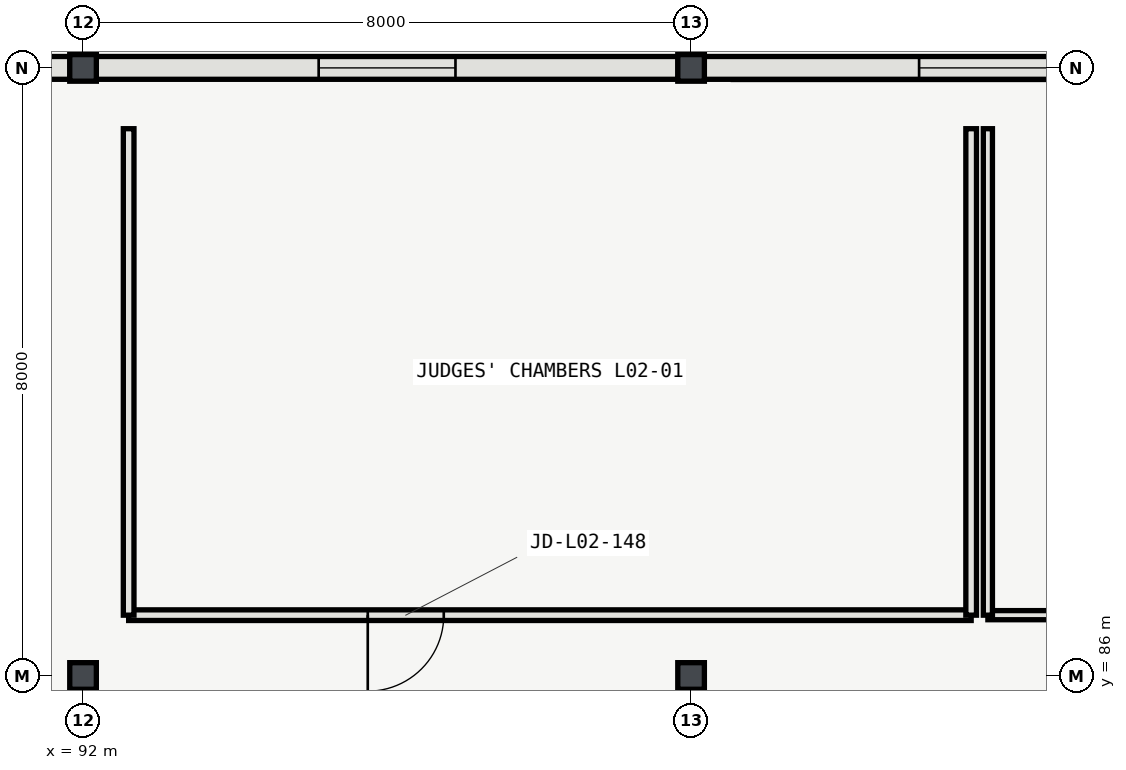
"""IFC4 building model, lengths in metres.
Left out: names, types, materials, properties, quantities, classifications, styles, units other than length and angle.
Written with IfcOpenShell. Run it as: python <this file> out.ifc"""

import sys

from ifc_helpers import new_model, si_unit, direction, frame, frame_2d, origin, origin_2d, place, context, subcontext, project, spatial, rectangle, i_section, extrude, element, fill, save


model = new_model("IFC4")
c1 = context("Model", 3, precision=1e-05, world=origin(), true_north=direction((0.0, 1.0)))
c2 = subcontext(c1, "Body", "Model", "MODEL_VIEW")
j1 = project(units=[si_unit("LENGTHUNIT", "METRE"), si_unit("PLANEANGLEUNIT", "RADIAN")], contexts=[c1])
p1 = place(None, origin())
s1 = spatial("IfcSite", under=j1, at=p1, CompositionType="ELEMENT")
p2 = place(p1, origin())
s2 = spatial("IfcBuilding", under=s1, at=p2, CompositionType="ELEMENT")
p3 = place(p2, frame((0.0, 0.0, 10.8)))
s3 = spatial("IfcBuildingStorey", under=s2, at=p3, CompositionType="ELEMENT", Elevation=10.8)
for number, where, z_axis, x_axis in (
    (1, (92.0, 86.0, 0.0), (0.0, 0.0, 1.0), (1.0, 0.0, 0.0)),
    (2, (92.0, 94.0, 0.0), (0.0, 0.0, 1.0), (1.0, 0.0, 0.0)),
    (3, (100.0, 86.0, 0.0), (0.0, 0.0, 1.0), (1.0, 0.0, 0.0)),
    (4, (100.0, 94.0, 0.0), (0.0, 0.0, 1.0), (1.0, 0.0, 0.0)),
):
    element("IfcColumn", number, at=place(p3, frame(where, z_axis=z_axis, x_axis=x_axis)), inside=s3, PredefinedType="COLUMN", context=c2, shape_type="SweptSolid", body=[
        extrude(i_section(OverallWidth=0.35, OverallDepth=0.35, WebThickness=0.012, FlangeThickness=0.019, FilletRadius=0.02, at=origin_2d()), origin(), (0.0, 0.0, 1.0), 5.4),
    ])
p4 = place(p3, frame((91.829, 94.0, 0.0), z_axis=(0.0, 0.0, 1.0), x_axis=(-1.0, 0.0, 0.0)))
e5 = element("IfcWall", 5, at=p4, inside=s3, PredefinedType="SOLIDWALL", context=c2, shape_type="SweptSolid", body=[
    extrude(rectangle(XDim=7.483, YDim=0.3, at=frame_2d((3.742, 0.0))), origin(), (0.0, 0.0, 1.0), 4.763),
])
p5 = place(p4, frame((3.004, 0.0, 0.95)))
e6 = element("IfcOpeningElement", 6, at=p5, cuts=e5, PredefinedType="OPENING", context=c2, shape_type="SweptSolid", body=[
    extrude(rectangle(XDim=1.65, YDim=2.1, at=frame_2d((0.825, 1.05))), frame((0.0, 0.16, 0.0), z_axis=(0.0, -1.0, 0.0), x_axis=(1.0, 0.0, 0.0)), (0.0, 0.0, 1.0), 0.32),
])
p6 = place(p3, frame((99.829, 94.0, 0.0), z_axis=(0.0, 0.0, 1.0), x_axis=(-1.0, 0.0, 0.0)))
e7 = element("IfcWall", 7, at=p6, inside=s3, PredefinedType="SOLIDWALL", context=c2, shape_type="SweptSolid", body=[
    extrude(rectangle(XDim=7.658, YDim=0.3, at=frame_2d((3.829, 0.0))), origin(), (0.0, 0.0, 1.0), 4.763),
])
p7 = place(p6, frame((2.929, 0.0, 0.95)))
e8 = element("IfcOpeningElement", 8, at=p7, cuts=e7, PredefinedType="OPENING", context=c2, shape_type="SweptSolid", body=[
    extrude(rectangle(XDim=1.8, YDim=2.1, at=frame_2d((0.9, 1.05))), frame((0.0, 0.16, 0.0), z_axis=(0.0, -1.0, 0.0), x_axis=(1.0, 0.0, 0.0)), (0.0, 0.0, 1.0), 0.32),
])
p8 = place(p3, frame((107.829, 94.0, 0.0), z_axis=(0.0, 0.0, 1.0), x_axis=(-1.0, 0.0, 0.0)))
e9 = element("IfcWall", 9, at=p8, inside=s3, PredefinedType="SOLIDWALL", context=c2, shape_type="SweptSolid", body=[
    extrude(rectangle(XDim=7.658, YDim=0.3, at=frame_2d((3.829, 0.0))), origin(), (0.0, 0.0, 1.0), 4.763),
])
p9 = place(p8, frame((2.829, 0.0, 0.95)))
e10 = element("IfcOpeningElement", 10, at=p9, cuts=e9, PredefinedType="OPENING", context=c2, shape_type="SweptSolid", body=[
    extrude(rectangle(XDim=2.0, YDim=2.1, at=frame_2d((1.0, 1.05))), frame((0.0, 0.16, 0.0), z_axis=(0.0, -1.0, 0.0), x_axis=(1.0, 0.0, 0.0)), (0.0, 0.0, 1.0), 0.32),
])
p10 = place(p3, frame((92.6, 86.8, 0.0), z_axis=(0.0, 0.0, 1.0), x_axis=(1.0, 0.0, 0.0)))
e11 = element("IfcWall", 11, at=p10, inside=s3, PredefinedType="PARTITIONING", context=c2, shape_type="SweptSolid", body=[
    extrude(rectangle(XDim=11.085, YDim=0.14, at=frame_2d((5.542, 0.0))), origin(), (0.0, 0.0, 1.0), 5.12),
])
p11 = place(p10, frame((3.146, 0.0, 0.0)))
e12 = element("IfcOpeningElement", 12, at=p11, cuts=e11, PredefinedType="OPENING", context=c2, shape_type="SweptSolid", body=[
    extrude(rectangle(XDim=1.0, YDim=2.2, at=frame_2d((0.5, 1.1))), frame((0.0, 0.08, 0.0), z_axis=(0.0, -1.0, 0.0), x_axis=(1.0, 0.0, 0.0)), (0.0, 0.0, 1.0), 0.16),
])
p12 = place(p3, frame((92.6, 93.2, 0.0), z_axis=(0.0, 0.0, 1.0), x_axis=(0.0, -1.0, 0.0)))
e13 = element("IfcWall", 13, at=p12, inside=s3, PredefinedType="PARTITIONING", context=c2, shape_type="SweptSolid", body=[
    extrude(rectangle(XDim=6.4, YDim=0.14, at=frame_2d((3.2, 0.0))), origin(), (0.0, 0.0, 1.0), 5.12),
])
p13 = place(p3, frame((103.685, 86.8, 0.0), z_axis=(0.0, 0.0, 1.0), x_axis=(0.0, 1.0, 0.0)))
e14 = element("IfcWall", 14, at=p13, inside=s3, PredefinedType="PARTITIONING", context=c2, shape_type="SweptSolid", body=[
    extrude(rectangle(XDim=6.4, YDim=0.14, at=frame_2d((3.2, 0.0))), origin(), (0.0, 0.0, 1.0), 4.806),
])
p14 = place(p3, frame((103.905, 86.8, 0.0), z_axis=(0.0, 0.0, 1.0), x_axis=(1.0, 0.0, 0.0)))
e15 = element("IfcWall", 15, at=p14, inside=s3, PredefinedType="PARTITIONING", context=c2, shape_type="SweptSolid", body=[
    extrude(rectangle(XDim=11.085, YDim=0.12, at=frame_2d((5.542, 0.0))), origin(), (0.0, 0.0, 1.0), 5.12),
])
p15 = place(p14, frame((7.904, 0.0, 0.0)))
e16 = element("IfcOpeningElement", 16, at=p15, cuts=e15, PredefinedType="OPENING", context=c2, shape_type="SweptSolid", body=[
    extrude(rectangle(XDim=0.98, YDim=2.2, at=frame_2d((0.49, 1.1))), frame((0.0, 0.07, 0.0), z_axis=(0.0, -1.0, 0.0), x_axis=(1.0, 0.0, 0.0)), (0.0, 0.0, 1.0), 0.14),
])
p16 = place(p3, frame((103.905, 93.2, 0.0), z_axis=(0.0, 0.0, 1.0), x_axis=(0.0, -1.0, 0.0)))
e17 = element("IfcWall", 17, at=p16, inside=s3, PredefinedType="PARTITIONING", context=c2, shape_type="SweptSolid", body=[
    extrude(rectangle(XDim=6.4, YDim=0.12, at=frame_2d((3.2, 0.0))), origin(), (0.0, 0.0, 1.0), 4.806),
])
p17 = place(p7, origin())
e18 = element("IfcWindow", 18, at=p17, inside=s3, PartitioningType="SINGLE_PANEL", PredefinedType="WINDOW", context=c2, shape_type="SweptSolid", body=[
    extrude(rectangle(XDim=1.8, YDim=2.1, at=frame_2d((0.9, 1.05))), frame((0.0, 0.03, 0.0), z_axis=(0.0, -1.0, 0.0), x_axis=(1.0, 0.0, 0.0)), (0.0, 0.0, 1.0), 0.06),
])
fill(e8, e18)
p18 = place(p9, origin())
e19 = element("IfcWindow", 19, at=p18, inside=s3, PartitioningType="SINGLE_PANEL", PredefinedType="WINDOW", context=c2, shape_type="SweptSolid", body=[
    extrude(rectangle(XDim=2.0, YDim=2.1, at=frame_2d((1.0, 1.05))), frame((0.0, 0.03, 0.0), z_axis=(0.0, -1.0, 0.0), x_axis=(1.0, 0.0, 0.0)), (0.0, 0.0, 1.0), 0.06),
])
fill(e10, e19)
p19 = place(p11, origin())
e20 = element("IfcDoor", 20, at=p19, inside=s3, OperationType="SINGLE_SWING_LEFT", PredefinedType="DOOR", context=c2, shape_type="SweptSolid", body=[
    extrude(rectangle(XDim=1.0, YDim=2.2, at=frame_2d((0.5, 1.1))), frame((0.0, 0.025, 0.0), z_axis=(0.0, -1.0, 0.0), x_axis=(1.0, 0.0, 0.0)), (0.0, 0.0, 1.0), 0.05),
])
fill(e12, e20)
save(model, sys.argv[1])
